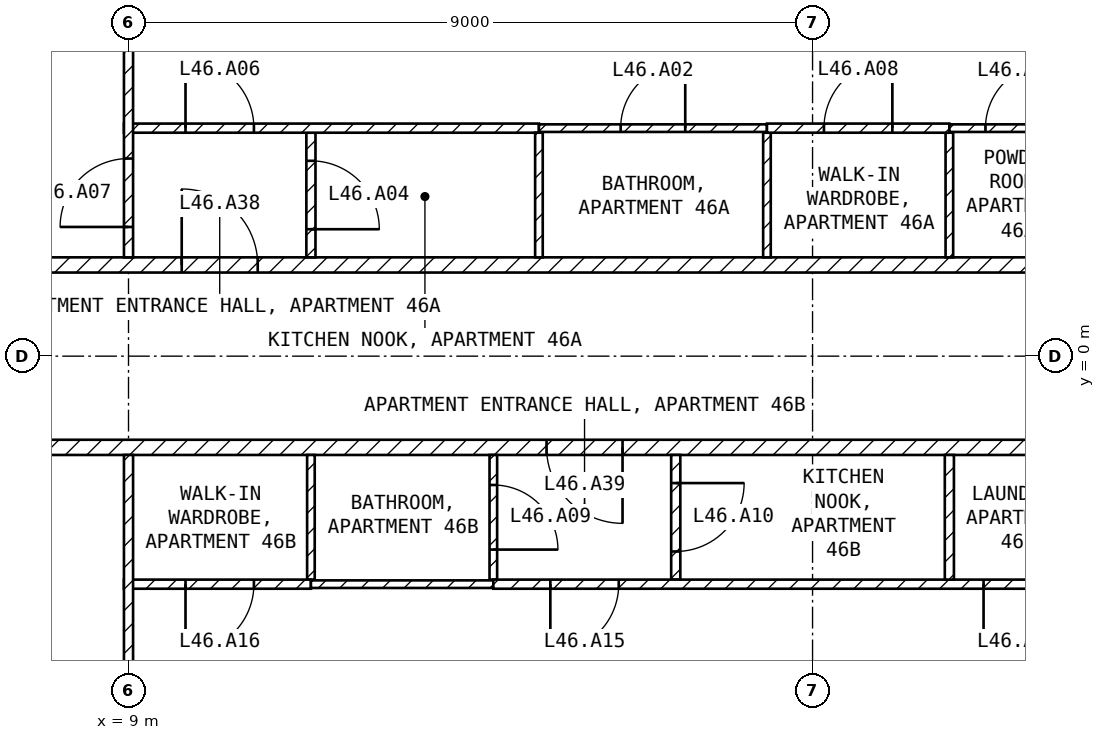
"""IFC4 building model, lengths in metres.
Left out: names, types, materials, properties, quantities, classifications, styles, units other than length and angle.
Written with IfcOpenShell. Run it as: python <this file> out.ifc"""

import sys

from ifc_helpers import new_model, si_unit, direction, frame, frame_2d, origin, place, context, subcontext, project, spatial, rectangle, extrude, element, fill, save


model = new_model("IFC4")
c1 = context("Model", 3, precision=1e-05, world=origin(), true_north=direction((0.0, 1.0)))
c2 = subcontext(c1, "Body", "Model", "MODEL_VIEW")
j1 = project(units=[si_unit("LENGTHUNIT", "METRE"), si_unit("PLANEANGLEUNIT", "RADIAN")], contexts=[c1])
p1 = place(None, origin())
s1 = spatial("IfcSite", under=j1, at=p1, CompositionType="ELEMENT")
p2 = place(p1, origin())
s2 = spatial("IfcBuilding", under=s1, at=p2, CompositionType="ELEMENT")
p3 = place(p2, frame((0.0, 0.0, 187.6)))
s3 = spatial("IfcBuildingStorey", under=s2, at=p3, CompositionType="ELEMENT", Elevation=187.6)
p4 = place(p3, frame((4.4, 1.2, 0.0), z_axis=(0.0, 0.0, 1.0), x_axis=(1.0, 0.0, 0.0)))
e1 = element("IfcWall", 1, at=p4, inside=s3, PredefinedType="PARTITIONING", context=c2, shape_type="SweptSolid", body=[
    extrude(rectangle(XDim=17.2, YDim=0.2, at=frame_2d((8.6, 0.0))), origin(), (0.0, 0.0, 1.0), 3.25),
])
p5 = place(p4, frame((5.3, 0.0, 0.0)))
e2 = element("IfcOpeningElement", 2, at=p5, cuts=e1, PredefinedType="OPENING", context=c2, shape_type="SweptSolid", body=[
    extrude(rectangle(XDim=1.0, YDim=2.1, at=frame_2d((0.5, 1.05))), frame((0.0, 0.11, 0.0), z_axis=(0.0, -1.0, 0.0), x_axis=(1.0, 0.0, 0.0)), (0.0, 0.0, 1.0), 0.22),
])
p6 = place(p3, frame((21.6, -1.2, 0.0), z_axis=(0.0, 0.0, 1.0), x_axis=(-1.0, 0.0, 0.0)))
e3 = element("IfcWall", 3, at=p6, inside=s3, PredefinedType="PARTITIONING", context=c2, shape_type="SweptSolid", body=[
    extrude(rectangle(XDim=17.2, YDim=0.2, at=frame_2d((8.6, 0.0))), origin(), (0.0, 0.0, 1.0), 3.25),
])
p7 = place(p6, frame((6.1, 0.0, 0.0)))
e4 = element("IfcOpeningElement", 4, at=p7, cuts=e3, PredefinedType="OPENING", context=c2, shape_type="SweptSolid", body=[
    extrude(rectangle(XDim=1.0, YDim=2.1, at=frame_2d((0.5, 1.05))), frame((0.0, 0.11, 0.0), z_axis=(0.0, -1.0, 0.0), x_axis=(1.0, 0.0, 0.0)), (0.0, 0.0, 1.0), 0.22),
])
p8 = place(p3, frame((11.4, 2.94, 0.0), z_axis=(0.0, 0.0, 1.0), x_axis=(0.0, -1.0, 0.0)))
e5 = element("IfcWall", 5, at=p8, inside=s3, PredefinedType="PARTITIONING", context=c2, shape_type="SweptSolid", body=[
    extrude(rectangle(XDim=1.64, YDim=0.12, at=frame_2d((0.82, 0.0))), origin(), (0.0, 0.0, 1.0), 3.25),
])
p9 = place(p8, frame((0.37, 0.0, 0.0)))
e6 = element("IfcOpeningElement", 6, at=p9, cuts=e5, PredefinedType="OPENING", context=c2, shape_type="SweptSolid", body=[
    extrude(rectangle(XDim=0.9, YDim=2.1, at=frame_2d((0.45, 1.05))), frame((0.0, 0.07, 0.0), z_axis=(0.0, -1.0, 0.0), x_axis=(1.0, 0.0, 0.0)), (0.0, 0.0, 1.0), 0.14),
])
p10 = place(p3, frame((8.94, 3.0, 0.0), z_axis=(0.0, 0.0, 1.0), x_axis=(1.0, 0.0, 0.0)))
e7 = element("IfcWall", 7, at=p10, inside=s3, PredefinedType="PARTITIONING", context=c2, shape_type="SweptSolid", body=[
    extrude(rectangle(XDim=5.46, YDim=0.12, at=frame_2d((2.73, 0.0))), origin(), (0.0, 0.0, 1.0), 3.25),
])
p11 = place(p10, frame((0.81, 0.0, 0.0)))
e8 = element("IfcOpeningElement", 8, at=p11, cuts=e7, PredefinedType="OPENING", context=c2, shape_type="SweptSolid", body=[
    extrude(rectangle(XDim=0.9, YDim=2.1, at=frame_2d((0.45, 1.05))), frame((0.0, 0.07, 0.0), z_axis=(0.0, -1.0, 0.0), x_axis=(1.0, 0.0, 0.0)), (0.0, 0.0, 1.0), 0.14),
])
p12 = place(p3, frame((9.0, 1.3, 0.0), z_axis=(0.0, 0.0, 1.0), x_axis=(0.0, 1.0, 0.0)))
e9 = element("IfcWall", 9, at=p12, inside=s3, PredefinedType="PARTITIONING", context=c2, shape_type="SweptSolid", body=[
    extrude(rectangle(XDim=7.62, YDim=0.12, at=frame_2d((3.81, 0.0))), origin(), (0.0, 0.0, 1.0), 3.25),
])
p13 = place(p12, frame((0.4, 0.0, 0.0)))
e10 = element("IfcOpeningElement", 10, at=p13, cuts=e9, PredefinedType="OPENING", context=c2, shape_type="SweptSolid", body=[
    extrude(rectangle(XDim=0.9, YDim=2.1, at=frame_2d((0.45, 1.05))), frame((0.0, 0.07, 0.0), z_axis=(0.0, -1.0, 0.0), x_axis=(1.0, 0.0, 0.0)), (0.0, 0.0, 1.0), 0.14),
])
for number, where, z_axis, x_axis in (
    (11, (14.4, 2.94, 0.0), (0.0, 0.0, 1.0), (0.0, -1.0, 0.0)),
    (12, (17.4, 2.94, 0.0), (0.0, 0.0, 1.0), (0.0, -1.0, 0.0)),
):
    element("IfcWall", number, at=place(p3, frame(where, z_axis=z_axis, x_axis=x_axis)), inside=s3, PredefinedType="PARTITIONING", context=c2, shape_type="SweptSolid", body=[
        extrude(rectangle(XDim=1.64, YDim=0.1, at=frame_2d((0.82, 0.0))), origin(), (0.0, 0.0, 1.0), 3.25),
    ])
p14 = place(p3, frame((14.4, 3.0, 0.0), z_axis=(0.0, 0.0, 1.0), x_axis=(1.0, 0.0, 0.0)))
e13 = element("IfcWall", 13, at=p14, inside=s3, PredefinedType="PARTITIONING", context=c2, shape_type="SweptSolid", body=[
    extrude(rectangle(XDim=3.0, YDim=0.1, at=frame_2d((1.5, 0.0))), origin(), (0.0, 0.0, 1.0), 3.25),
])
p15 = place(p14, frame((1.075, 0.0, 0.0)))
e14 = element("IfcOpeningElement", 14, at=p15, cuts=e13, PredefinedType="OPENING", context=c2, shape_type="SweptSolid", body=[
    extrude(rectangle(XDim=0.85, YDim=2.1, at=frame_2d((0.425, 1.05))), frame((0.0, 0.06, 0.0), z_axis=(0.0, -1.0, 0.0), x_axis=(1.0, 0.0, 0.0)), (0.0, 0.0, 1.0), 0.12),
])
p16 = place(p3, frame((19.8, 2.94, 0.0), z_axis=(0.0, 0.0, 1.0), x_axis=(0.0, -1.0, 0.0)))
e15 = element("IfcWall", 15, at=p16, inside=s3, PredefinedType="PARTITIONING", context=c2, shape_type="SweptSolid", body=[
    extrude(rectangle(XDim=1.64, YDim=0.1, at=frame_2d((0.82, 0.0))), origin(), (0.0, 0.0, 1.0), 3.25),
])
p17 = place(p3, frame((17.4, 3.0, 0.0), z_axis=(0.0, 0.0, 1.0), x_axis=(1.0, 0.0, 0.0)))
e16 = element("IfcWall", 16, at=p17, inside=s3, PredefinedType="PARTITIONING", context=c2, shape_type="SweptSolid", body=[
    extrude(rectangle(XDim=2.4, YDim=0.12, at=frame_2d((1.2, 0.0))), origin(), (0.0, 0.0, 1.0), 3.25),
])
p18 = place(p17, frame((0.75, 0.0, 0.0)))
e17 = element("IfcOpeningElement", 17, at=p18, cuts=e16, PredefinedType="OPENING", context=c2, shape_type="SweptSolid", body=[
    extrude(rectangle(XDim=0.9, YDim=2.1, at=frame_2d((0.45, 1.05))), frame((0.0, 0.07, 0.0), z_axis=(0.0, -1.0, 0.0), x_axis=(1.0, 0.0, 0.0)), (0.0, 0.0, 1.0), 0.14),
])
p19 = place(p3, frame((19.8, 3.0, 0.0), z_axis=(0.0, 0.0, 1.0), x_axis=(1.0, 0.0, 0.0)))
e18 = element("IfcWall", 18, at=p19, inside=s3, PredefinedType="PARTITIONING", context=c2, shape_type="SweptSolid", body=[
    extrude(rectangle(XDim=1.8, YDim=0.1, at=frame_2d((0.9, 0.0))), origin(), (0.0, 0.0, 1.0), 3.25),
])
p20 = place(p19, frame((0.475, 0.0, 0.0)))
e19 = element("IfcOpeningElement", 19, at=p20, cuts=e18, PredefinedType="OPENING", context=c2, shape_type="SweptSolid", body=[
    extrude(rectangle(XDim=0.85, YDim=2.1, at=frame_2d((0.425, 1.05))), frame((0.0, 0.06, 0.0), z_axis=(0.0, -1.0, 0.0), x_axis=(1.0, 0.0, 0.0)), (0.0, 0.0, 1.0), 0.12),
])
p21 = place(p3, frame((11.4, -1.3, 0.0), z_axis=(0.0, 0.0, 1.0), x_axis=(0.0, -1.0, 0.0)))
e20 = element("IfcWall", 20, at=p21, inside=s3, PredefinedType="PARTITIONING", context=c2, shape_type="SweptSolid", body=[
    extrude(rectangle(XDim=1.64, YDim=0.1, at=frame_2d((0.82, 0.0))), origin(), (0.0, 0.0, 1.0), 3.25),
])
p22 = place(p3, frame((11.4, -3.0, 0.0), z_axis=(0.0, 0.0, 1.0), x_axis=(-1.0, 0.0, 0.0)))
e21 = element("IfcWall", 21, at=p22, inside=s3, PredefinedType="PARTITIONING", context=c2, shape_type="SweptSolid", body=[
    extrude(rectangle(XDim=2.46, YDim=0.12, at=frame_2d((1.23, 0.0))), origin(), (0.0, 0.0, 1.0), 3.25),
])
p23 = place(p22, frame((0.75, 0.0, 0.0)))
e22 = element("IfcOpeningElement", 22, at=p23, cuts=e21, PredefinedType="OPENING", context=c2, shape_type="SweptSolid", body=[
    extrude(rectangle(XDim=0.9, YDim=2.1, at=frame_2d((0.45, 1.05))), frame((0.0, 0.07, 0.0), z_axis=(0.0, -1.0, 0.0), x_axis=(1.0, 0.0, 0.0)), (0.0, 0.0, 1.0), 0.14),
])
p24 = place(p3, frame((9.0, -8.92, 0.0), z_axis=(0.0, 0.0, 1.0), x_axis=(0.0, 1.0, 0.0)))
e23 = element("IfcWall", 23, at=p24, inside=s3, PredefinedType="PARTITIONING", context=c2, shape_type="SweptSolid", body=[
    extrude(rectangle(XDim=7.62, YDim=0.12, at=frame_2d((3.81, 0.0))), origin(), (0.0, 0.0, 1.0), 3.25),
])
p25 = place(p24, frame((2.62, 0.0, 0.0)))
e24 = element("IfcOpeningElement", 24, at=p25, cuts=e23, PredefinedType="OPENING", context=c2, shape_type="SweptSolid", body=[
    extrude(rectangle(XDim=0.9, YDim=2.1, at=frame_2d((0.45, 1.05))), frame((0.0, 0.07, 0.0), z_axis=(0.0, -1.0, 0.0), x_axis=(1.0, 0.0, 0.0)), (0.0, 0.0, 1.0), 0.14),
])
p26 = place(p3, frame((13.8, -1.3, 0.0), z_axis=(0.0, 0.0, 1.0), x_axis=(0.0, -1.0, 0.0)))
e25 = element("IfcWall", 25, at=p26, inside=s3, PredefinedType="PARTITIONING", context=c2, shape_type="SweptSolid", body=[
    extrude(rectangle(XDim=1.64, YDim=0.1, at=frame_2d((0.82, 0.0))), origin(), (0.0, 0.0, 1.0), 3.25),
])
p27 = place(p26, frame((0.395, 0.0, 0.0)))
e26 = element("IfcOpeningElement", 26, at=p27, cuts=e25, PredefinedType="OPENING", context=c2, shape_type="SweptSolid", body=[
    extrude(rectangle(XDim=0.85, YDim=2.1, at=frame_2d((0.425, 1.05))), frame((0.0, 0.06, 0.0), z_axis=(0.0, -1.0, 0.0), x_axis=(1.0, 0.0, 0.0)), (0.0, 0.0, 1.0), 0.12),
])
p28 = place(p3, frame((13.8, -3.0, 0.0), z_axis=(0.0, 0.0, 1.0), x_axis=(-1.0, 0.0, 0.0)))
e27 = element("IfcWall", 27, at=p28, inside=s3, PredefinedType="PARTITIONING", context=c2, shape_type="SweptSolid", body=[
    extrude(rectangle(XDim=2.4, YDim=0.1, at=frame_2d((1.2, 0.0))), origin(), (0.0, 0.0, 1.0), 3.25),
])
p29 = place(p3, frame((16.2, -1.3, 0.0), z_axis=(0.0, 0.0, 1.0), x_axis=(0.0, -1.0, 0.0)))
e28 = element("IfcWall", 28, at=p29, inside=s3, PredefinedType="PARTITIONING", context=c2, shape_type="SweptSolid", body=[
    extrude(rectangle(XDim=1.64, YDim=0.12, at=frame_2d((0.82, 0.0))), origin(), (0.0, 0.0, 1.0), 3.25),
])
p30 = place(p29, frame((0.37, 0.0, 0.0)))
e29 = element("IfcOpeningElement", 29, at=p30, cuts=e28, PredefinedType="OPENING", context=c2, shape_type="SweptSolid", body=[
    extrude(rectangle(XDim=0.9, YDim=2.1, at=frame_2d((0.45, 1.05))), frame((0.0, 0.07, 0.0), z_axis=(0.0, -1.0, 0.0), x_axis=(1.0, 0.0, 0.0)), (0.0, 0.0, 1.0), 0.14),
])
p31 = place(p3, frame((21.6, -3.0, 0.0), z_axis=(0.0, 0.0, 1.0), x_axis=(-1.0, 0.0, 0.0)))
e30 = element("IfcWall", 30, at=p31, inside=s3, PredefinedType="PARTITIONING", context=c2, shape_type="SweptSolid", body=[
    extrude(rectangle(XDim=7.8, YDim=0.12, at=frame_2d((3.9, 0.0))), origin(), (0.0, 0.0, 1.0), 3.25),
])
p32 = place(p31, frame((0.45, 0.0, 0.0)))
e31 = element("IfcOpeningElement", 31, at=p32, cuts=e30, PredefinedType="OPENING", context=c2, shape_type="SweptSolid", body=[
    extrude(rectangle(XDim=0.9, YDim=2.1, at=frame_2d((0.45, 1.05))), frame((0.0, 0.07, 0.0), z_axis=(0.0, -1.0, 0.0), x_axis=(1.0, 0.0, 0.0)), (0.0, 0.0, 1.0), 0.14),
])
p33 = place(p31, frame((6.15, 0.0, 0.0)))
e32 = element("IfcOpeningElement", 32, at=p33, cuts=e30, PredefinedType="OPENING", context=c2, shape_type="SweptSolid", body=[
    extrude(rectangle(XDim=0.9, YDim=2.1, at=frame_2d((0.45, 1.05))), frame((0.0, 0.07, 0.0), z_axis=(0.0, -1.0, 0.0), x_axis=(1.0, 0.0, 0.0)), (0.0, 0.0, 1.0), 0.14),
])
p34 = place(p3, frame((19.8, -1.3, 0.0), z_axis=(0.0, 0.0, 1.0), x_axis=(0.0, -1.0, 0.0)))
e33 = element("IfcWall", 33, at=p34, inside=s3, PredefinedType="PARTITIONING", context=c2, shape_type="SweptSolid", body=[
    extrude(rectangle(XDim=1.64, YDim=0.12, at=frame_2d((0.82, 0.0))), origin(), (0.0, 0.0, 1.0), 3.25),
])
p35 = place(p15, origin())
e34 = element("IfcDoor", 34, at=p35, inside=s3, OperationType="SINGLE_SWING_RIGHT", PredefinedType="DOOR", context=c2, shape_type="SweptSolid", body=[
    extrude(rectangle(XDim=0.85, YDim=2.1, at=frame_2d((0.425, 1.05))), frame((0.0, 0.025, 0.0), z_axis=(0.0, -1.0, 0.0), x_axis=(1.0, 0.0, 0.0)), (0.0, 0.0, 1.0), 0.05),
])
fill(e14, e34)
p36 = place(p9, origin())
e35 = element("IfcDoor", 35, at=p36, inside=s3, OperationType="SINGLE_SWING_RIGHT", PredefinedType="DOOR", context=c2, shape_type="SweptSolid", body=[
    extrude(rectangle(XDim=0.9, YDim=2.1, at=frame_2d((0.45, 1.05))), frame((0.0, 0.025, 0.0), z_axis=(0.0, -1.0, 0.0), x_axis=(1.0, 0.0, 0.0)), (0.0, 0.0, 1.0), 0.05),
])
fill(e6, e35)
p37 = place(p20, origin())
e36 = element("IfcDoor", 36, at=p37, inside=s3, OperationType="SINGLE_SWING_RIGHT", PredefinedType="DOOR", context=c2, shape_type="SweptSolid", body=[
    extrude(rectangle(XDim=0.85, YDim=2.1, at=frame_2d((0.425, 1.05))), frame((0.0, 0.025, 0.0), z_axis=(0.0, -1.0, 0.0), x_axis=(1.0, 0.0, 0.0)), (0.0, 0.0, 1.0), 0.05),
])
fill(e19, e36)
p38 = place(p11, origin())
e37 = element("IfcDoor", 37, at=p38, inside=s3, OperationType="SINGLE_SWING_LEFT", PredefinedType="DOOR", context=c2, shape_type="SweptSolid", body=[
    extrude(rectangle(XDim=0.9, YDim=2.1, at=frame_2d((0.45, 1.05))), frame((0.0, 0.025, 0.0), z_axis=(0.0, -1.0, 0.0), x_axis=(1.0, 0.0, 0.0)), (0.0, 0.0, 1.0), 0.05),
])
fill(e8, e37)
p39 = place(p13, origin())
e38 = element("IfcDoor", 38, at=p39, inside=s3, OperationType="SINGLE_SWING_LEFT", PredefinedType="DOOR", context=c2, shape_type="SweptSolid", body=[
    extrude(rectangle(XDim=0.9, YDim=2.1, at=frame_2d((0.45, 1.05))), frame((0.0, 0.025, 0.0), z_axis=(0.0, -1.0, 0.0), x_axis=(1.0, 0.0, 0.0)), (0.0, 0.0, 1.0), 0.05),
])
fill(e10, e38)
p40 = place(p18, origin())
e39 = element("IfcDoor", 39, at=p40, inside=s3, OperationType="SINGLE_SWING_RIGHT", PredefinedType="DOOR", context=c2, shape_type="SweptSolid", body=[
    extrude(rectangle(XDim=0.9, YDim=2.1, at=frame_2d((0.45, 1.05))), frame((0.0, 0.025, 0.0), z_axis=(0.0, -1.0, 0.0), x_axis=(1.0, 0.0, 0.0)), (0.0, 0.0, 1.0), 0.05),
])
fill(e17, e39)
p41 = place(p27, origin())
e40 = element("IfcDoor", 40, at=p41, inside=s3, OperationType="SINGLE_SWING_RIGHT", PredefinedType="DOOR", context=c2, shape_type="SweptSolid", body=[
    extrude(rectangle(XDim=0.85, YDim=2.1, at=frame_2d((0.425, 1.05))), frame((0.0, 0.025, 0.0), z_axis=(0.0, -1.0, 0.0), x_axis=(1.0, 0.0, 0.0)), (0.0, 0.0, 1.0), 0.05),
])
fill(e26, e40)
p42 = place(p30, origin())
e41 = element("IfcDoor", 41, at=p42, inside=s3, OperationType="SINGLE_SWING_LEFT", PredefinedType="DOOR", context=c2, shape_type="SweptSolid", body=[
    extrude(rectangle(XDim=0.9, YDim=2.1, at=frame_2d((0.45, 1.05))), frame((0.0, 0.025, 0.0), z_axis=(0.0, -1.0, 0.0), x_axis=(1.0, 0.0, 0.0)), (0.0, 0.0, 1.0), 0.05),
])
fill(e29, e41)
p43 = place(p32, origin())
e42 = element("IfcDoor", 42, at=p43, inside=s3, OperationType="SINGLE_SWING_RIGHT", PredefinedType="DOOR", context=c2, shape_type="SweptSolid", body=[
    extrude(rectangle(XDim=0.9, YDim=2.1, at=frame_2d((0.45, 1.05))), frame((0.0, 0.025, 0.0), z_axis=(0.0, -1.0, 0.0), x_axis=(1.0, 0.0, 0.0)), (0.0, 0.0, 1.0), 0.05),
])
fill(e31, e42)
p44 = place(p33, origin())
e43 = element("IfcDoor", 43, at=p44, inside=s3, OperationType="SINGLE_SWING_RIGHT", PredefinedType="DOOR", context=c2, shape_type="SweptSolid", body=[
    extrude(rectangle(XDim=0.9, YDim=2.1, at=frame_2d((0.45, 1.05))), frame((0.0, 0.025, 0.0), z_axis=(0.0, -1.0, 0.0), x_axis=(1.0, 0.0, 0.0)), (0.0, 0.0, 1.0), 0.05),
])
fill(e32, e43)
p45 = place(p23, origin())
e44 = element("IfcDoor", 44, at=p45, inside=s3, OperationType="SINGLE_SWING_RIGHT", PredefinedType="DOOR", context=c2, shape_type="SweptSolid", body=[
    extrude(rectangle(XDim=0.9, YDim=2.1, at=frame_2d((0.45, 1.05))), frame((0.0, 0.025, 0.0), z_axis=(0.0, -1.0, 0.0), x_axis=(1.0, 0.0, 0.0)), (0.0, 0.0, 1.0), 0.05),
])
fill(e22, e44)
p46 = place(p5, origin())
e45 = element("IfcDoor", 45, at=p46, inside=s3, OperationType="SINGLE_SWING_LEFT", PredefinedType="DOOR", context=c2, shape_type="SweptSolid", body=[
    extrude(rectangle(XDim=1.0, YDim=2.1, at=frame_2d((0.5, 1.05))), frame((0.0, 0.025, 0.0), z_axis=(0.0, -1.0, 0.0), x_axis=(1.0, 0.0, 0.0)), (0.0, 0.0, 1.0), 0.05),
])
fill(e2, e45)
p47 = place(p7, origin())
e46 = element("IfcDoor", 46, at=p47, inside=s3, OperationType="SINGLE_SWING_LEFT", PredefinedType="DOOR", context=c2, shape_type="SweptSolid", body=[
    extrude(rectangle(XDim=1.0, YDim=2.1, at=frame_2d((0.5, 1.05))), frame((0.0, 0.025, 0.0), z_axis=(0.0, -1.0, 0.0), x_axis=(1.0, 0.0, 0.0)), (0.0, 0.0, 1.0), 0.05),
])
fill(e4, e46)
save(model, sys.argv[1])
